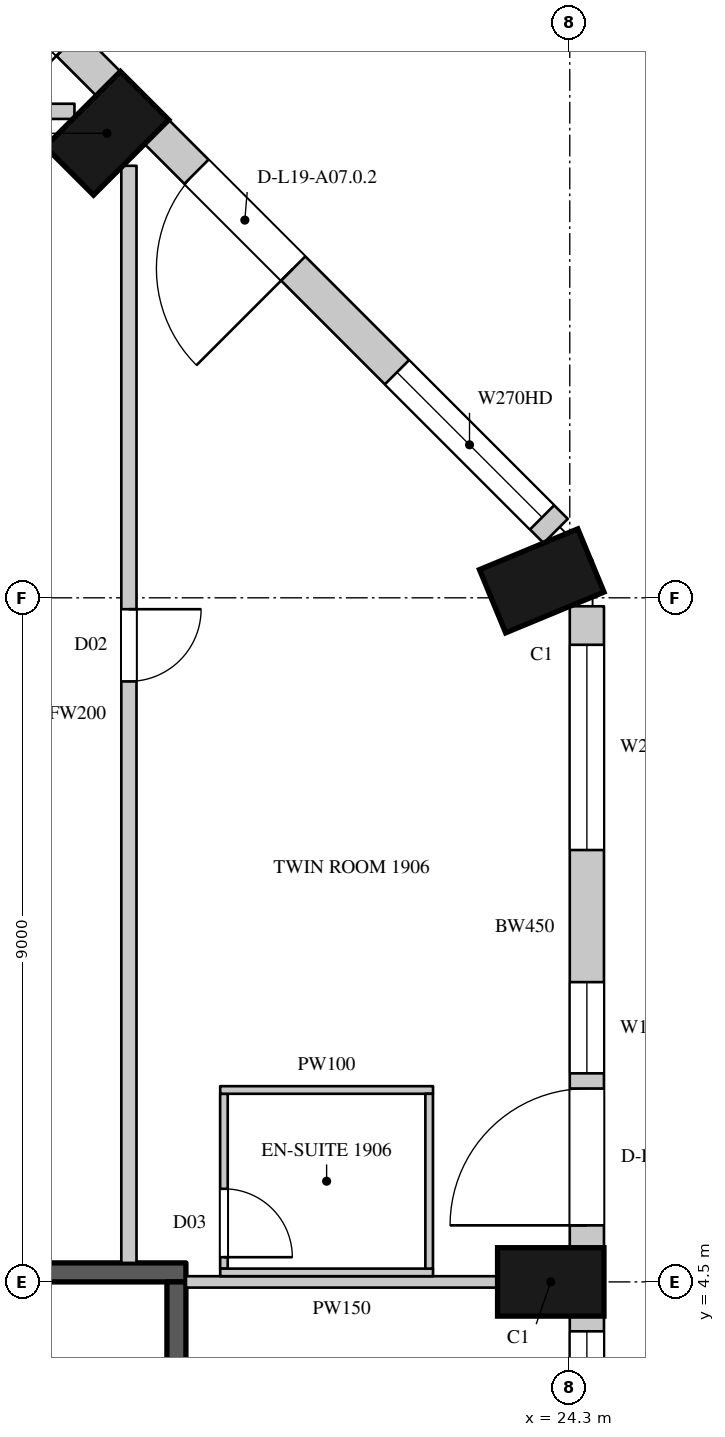
"""IFC4 building model, lengths in metres.
Left out: names, types, materials, properties, quantities, classifications, styles, units other than length and angle.
Written with IfcOpenShell. Run it as: python <this file> out.ifc"""

import sys

from ifc_helpers import new_model, si_unit, direction, frame, frame_2d, origin, origin_2d, place, context, subcontext, project, spatial, rectangle, extrude, element, fill, save


model = new_model("IFC4")
c1 = context("Model", 3, precision=1e-05, world=origin(), true_north=direction((0.0, 1.0)))
c2 = subcontext(c1, "Body", "Model", "MODEL_VIEW")
j1 = project(units=[si_unit("LENGTHUNIT", "METRE"), si_unit("PLANEANGLEUNIT", "RADIAN")], contexts=[c1])
p1 = place(None, origin())
s1 = spatial("IfcSite", under=j1, at=p1, CompositionType="ELEMENT")
p2 = place(p1, origin())
s2 = spatial("IfcBuilding", under=s1, at=p2, CompositionType="ELEMENT")
p3 = place(p2, frame((0.0, 0.0, 98.7)))
s3 = spatial("IfcBuildingStorey", under=s2, at=p3, CompositionType="ELEMENT", Elevation=98.7)
for number, where, z_axis, x_axis in (
    (1, (24.05, 4.5, 0.0), (0.0, 0.0, 1.0), (0.0, 1.0, 0.0)),
    (2, (23.931, 13.723, 0.0), (0.0, 0.0, 1.0), (-0.383, 0.924, 0.0)),
    (3, (18.211, 19.611, 0.0), (0.0, 0.0, 1.0), (-0.707, 0.707, 0.0)),
):
    element("IfcColumn", number, at=place(p3, frame(where, z_axis=z_axis, x_axis=x_axis)), inside=s3, PredefinedType="COLUMN", context=c2, shape_type="SweptSolid", body=[
        extrude(rectangle(XDim=0.9, YDim=1.4, at=origin_2d()), origin(), (0.0, 0.0, 1.0), 3.6),
    ])
p4 = place(p3, frame((24.525, -4.05, 0.0), z_axis=(0.0, 0.0, 1.0), x_axis=(0.0, 1.0, 0.0)))
e4 = element("IfcWall", 4, at=p4, inside=s3, PredefinedType="SOLIDWALL", context=c2, shape_type="SweptSolid", body=[
    extrude(rectangle(XDim=8.1, YDim=0.45, at=frame_2d((4.05, 0.0))), origin(), (0.0, 0.0, 1.0), 3.3),
])
p5 = place(p4, frame((0.2, 0.0, 0.0)))
e5 = element("IfcOpeningElement", 5, at=p5, cuts=e4, PredefinedType="OPENING", context=c2, shape_type="SweptSolid", body=[
    extrude(rectangle(XDim=1.8, YDim=2.4, at=frame_2d((0.9, 1.2))), frame((0.0, 0.235, 0.0), z_axis=(0.0, -1.0, 0.0), x_axis=(1.0, 0.0, 0.0)), (0.0, 0.0, 1.0), 0.47),
])
p6 = place(p4, frame((2.2, 0.0, 1.05)))
e6 = element("IfcOpeningElement", 6, at=p6, cuts=e4, PredefinedType="OPENING", context=c2, shape_type="SweptSolid", body=[
    extrude(rectangle(XDim=1.2, YDim=2.0, at=frame_2d((0.6, 1.0))), frame((0.0, 0.235, 0.0), z_axis=(0.0, -1.0, 0.0), x_axis=(1.0, 0.0, 0.0)), (0.0, 0.0, 1.0), 0.47),
])
p7 = place(p4, frame((4.7, 0.0, 0.0)))
e7 = element("IfcOpeningElement", 7, at=p7, cuts=e4, PredefinedType="OPENING", context=c2, shape_type="SweptSolid", body=[
    extrude(rectangle(XDim=1.8, YDim=2.4, at=frame_2d((0.9, 1.2))), frame((0.0, 0.235, 0.0), z_axis=(0.0, -1.0, 0.0), x_axis=(1.0, 0.0, 0.0)), (0.0, 0.0, 1.0), 0.47),
])
p8 = place(p4, frame((6.7, 0.0, 1.05)))
e8 = element("IfcOpeningElement", 8, at=p8, cuts=e4, PredefinedType="OPENING", context=c2, shape_type="SweptSolid", body=[
    extrude(rectangle(XDim=1.2, YDim=2.0, at=frame_2d((0.6, 1.0))), frame((0.0, 0.235, 0.0), z_axis=(0.0, -1.0, 0.0), x_axis=(1.0, 0.0, 0.0)), (0.0, 0.0, 1.0), 0.47),
])
p9 = place(p3, frame((24.525, 4.95, 0.0), z_axis=(0.0, 0.0, 1.0), x_axis=(0.0, 1.0, 0.0)))
e9 = element("IfcWall", 9, at=p9, inside=s3, PredefinedType="SOLIDWALL", context=c2, shape_type="SweptSolid", body=[
    extrude(rectangle(XDim=8.439, YDim=0.45, at=frame_2d((4.219, 0.0))), origin(), (0.0, 0.0, 1.0), 3.3),
])
p10 = place(p9, frame((0.294, 0.0, 0.0)))
e10 = element("IfcOpeningElement", 10, at=p10, cuts=e9, PredefinedType="OPENING", context=c2, shape_type="SweptSolid", body=[
    extrude(rectangle(XDim=1.8, YDim=2.4, at=frame_2d((0.9, 1.2))), frame((0.0, 0.235, 0.0), z_axis=(0.0, -1.0, 0.0), x_axis=(1.0, 0.0, 0.0)), (0.0, 0.0, 1.0), 0.47),
])
p11 = place(p9, frame((2.294, 0.0, 1.05)))
e11 = element("IfcOpeningElement", 11, at=p11, cuts=e9, PredefinedType="OPENING", context=c2, shape_type="SweptSolid", body=[
    extrude(rectangle(XDim=1.2, YDim=2.0, at=frame_2d((0.6, 1.0))), frame((0.0, 0.235, 0.0), z_axis=(0.0, -1.0, 0.0), x_axis=(1.0, 0.0, 0.0)), (0.0, 0.0, 1.0), 0.47),
])
p12 = place(p9, frame((5.232, 0.0, 1.05)))
e12 = element("IfcOpeningElement", 12, at=p12, cuts=e9, PredefinedType="OPENING", context=c2, shape_type="SweptSolid", body=[
    extrude(rectangle(XDim=2.7, YDim=2.0, at=frame_2d((1.35, 1.0))), frame((0.0, 0.235, 0.0), z_axis=(0.0, -1.0, 0.0), x_axis=(1.0, 0.0, 0.0)), (0.0, 0.0, 1.0), 0.47),
])
p13 = place(p3, frame((24.115, 14.379, 0.0), z_axis=(0.0, 0.0, 1.0), x_axis=(-0.707106781187, 0.707106781187, 0.0)))
e13 = element("IfcWall", 13, at=p13, inside=s3, PredefinedType="SOLIDWALL", context=c2, shape_type="SweptSolid", body=[
    extrude(rectangle(XDim=7.424, YDim=0.45, at=frame_2d((3.712, 0.0))), origin(), (0.0, 0.0, 1.0), 3.3),
])
p14 = place(p13, frame((0.253, 0.0, 1.05)))
e14 = element("IfcOpeningElement", 14, at=p14, cuts=e13, PredefinedType="OPENING", context=c2, shape_type="SweptSolid", body=[
    extrude(rectangle(XDim=2.7, YDim=2.0, at=frame_2d((1.35, 1.0))), frame((0.0, 0.235, 0.0), z_axis=(0.0, -1.0, 0.0), x_axis=(1.0, 0.0, 0.0)), (0.0, 0.0, 1.0), 0.47),
])
p15 = place(p13, frame((4.884, 0.0, 0.0)))
e15 = element("IfcOpeningElement", 15, at=p15, cuts=e13, PredefinedType="OPENING", context=c2, shape_type="SweptSolid", body=[
    extrude(rectangle(XDim=1.8, YDim=2.4, at=frame_2d((0.9, 1.2))), frame((0.0, 0.235, 0.0), z_axis=(0.0, -1.0, 0.0), x_axis=(1.0, 0.0, 0.0)), (0.0, 0.0, 1.0), 0.47),
])
p16 = place(p3, frame((18.229, 20.265, 0.0), z_axis=(0.0, 0.0, 1.0), x_axis=(-0.707106781187, 0.707106781187, 0.0)))
e16 = element("IfcWall", 16, at=p16, inside=s3, PredefinedType="SOLIDWALL", context=c2, shape_type="SweptSolid", body=[
    extrude(rectangle(XDim=7.424, YDim=0.45, at=frame_2d((3.712, 0.0))), origin(), (0.0, 0.0, 1.0), 3.3),
])
p17 = place(p16, frame((0.74, 0.0, 0.0)))
e17 = element("IfcOpeningElement", 17, at=p17, cuts=e16, PredefinedType="OPENING", context=c2, shape_type="SweptSolid", body=[
    extrude(rectangle(XDim=1.8, YDim=2.4, at=frame_2d((0.9, 1.2))), frame((0.0, 0.235, 0.0), z_axis=(0.0, -1.0, 0.0), x_axis=(1.0, 0.0, 0.0)), (0.0, 0.0, 1.0), 0.47),
])
p18 = place(p16, frame((4.471, 0.0, 1.05)))
e18 = element("IfcOpeningElement", 18, at=p18, cuts=e16, PredefinedType="OPENING", context=c2, shape_type="SweptSolid", body=[
    extrude(rectangle(XDim=2.7, YDim=2.0, at=frame_2d((1.35, 1.0))), frame((0.0, 0.235, 0.0), z_axis=(0.0, -1.0, 0.0), x_axis=(1.0, 0.0, 0.0)), (0.0, 0.0, 1.0), 0.47),
])
p19 = place(p3, frame((23.15, 16.864, 0.0), z_axis=(0.0, 0.0, 1.0), x_axis=(-0.707106781187, 0.707106781187, 0.0)))
e19 = element("IfcWall", 19, at=p19, inside=s3, PredefinedType="SOLIDWALL", context=c2, shape_type="SweptSolid", body=[
    extrude(rectangle(XDim=1.445, YDim=0.45, at=frame_2d((0.722, 0.0))), origin(), (0.0, 0.0, 1.0), 0.6),
])
p20 = place(p3, frame((19.937, 20.078, 0.0), z_axis=(0.0, 0.0, 1.0), x_axis=(-0.707106781187, 0.707106781187, 0.0)))
e20 = element("IfcWall", 20, at=p20, inside=s3, PredefinedType="SOLIDWALL", context=c2, shape_type="SweptSolid", body=[
    extrude(rectangle(XDim=1.781, YDim=0.45, at=frame_2d((0.89, 0.0))), origin(), (0.0, 0.0, 1.0), 0.6),
])
p21 = place(p3, frame((-23.765, 19.9, 0.0), z_axis=(0.0, 0.0, 1.0), x_axis=(1.0, 0.0, 0.0)))
e21 = element("IfcWall", 21, at=p21, inside=s3, PredefinedType="PARTITIONING", context=c2, shape_type="SweptSolid", body=[
    extrude(rectangle(XDim=41.549, YDim=0.2, at=frame_2d((20.774, 0.0))), origin(), (0.0, 0.0, 1.0), 3.3),
])
p22 = place(p21, frame((14.2, 0.0, 0.0)))
e22 = element("IfcOpeningElement", 22, at=p22, cuts=e21, PredefinedType="OPENING", context=c2, shape_type="SweptSolid", body=[
    extrude(rectangle(XDim=0.9, YDim=2.2, at=frame_2d((0.45, 1.1))), frame((0.0, 0.11, 0.0), z_axis=(0.0, -1.0, 0.0), x_axis=(1.0, 0.0, 0.0)), (0.0, 0.0, 1.0), 0.22),
])
p23 = place(p21, frame((27.05, 0.0, 0.0)))
e23 = element("IfcOpeningElement", 23, at=p23, cuts=e21, PredefinedType="OPENING", context=c2, shape_type="SweptSolid", body=[
    extrude(rectangle(XDim=0.9, YDim=2.2, at=frame_2d((0.45, 1.1))), frame((0.0, 0.11, 0.0), z_axis=(0.0, -1.0, 0.0), x_axis=(1.0, 0.0, 0.0)), (0.0, 0.0, 1.0), 0.22),
])
p24 = place(p21, frame((0.75, 0.0, 0.0)))
e24 = element("IfcOpeningElement", 24, at=p24, cuts=e21, PredefinedType="OPENING", context=c2, shape_type="SweptSolid", body=[
    extrude(rectangle(XDim=1.1, YDim=2.4, at=frame_2d((0.55, 1.2))), frame((0.0, 0.11, 0.0), z_axis=(0.0, -1.0, 0.0), x_axis=(1.0, 0.0, 0.0)), (0.0, 0.0, 1.0), 0.22),
])
p25 = place(p21, frame((23.15, 0.0, 0.0)))
e25 = element("IfcOpeningElement", 25, at=p25, cuts=e21, PredefinedType="OPENING", context=c2, shape_type="SweptSolid", body=[
    extrude(rectangle(XDim=0.95, YDim=2.2, at=frame_2d((0.475, 1.1))), frame((0.0, 0.11, 0.0), z_axis=(0.0, -1.0, 0.0), x_axis=(1.0, 0.0, 0.0)), (0.0, 0.0, 1.0), 0.22),
])
p26 = place(p21, frame((34.95, 0.0, 0.0)))
e26 = element("IfcOpeningElement", 26, at=p26, cuts=e21, PredefinedType="OPENING", context=c2, shape_type="SweptSolid", body=[
    extrude(rectangle(XDim=0.95, YDim=2.2, at=frame_2d((0.475, 1.1))), frame((0.0, 0.11, 0.0), z_axis=(0.0, -1.0, 0.0), x_axis=(1.0, 0.0, 0.0)), (0.0, 0.0, 1.0), 0.22),
])
p27 = place(p3, frame((18.5, 4.75, 0.0), z_axis=(0.0, 0.0, 1.0), x_axis=(0.0, 1.0, 0.0)))
e27 = element("IfcWall", 27, at=p27, inside=s3, PredefinedType="PARTITIONING", context=c2, shape_type="SweptSolid", body=[
    extrude(rectangle(XDim=14.434, YDim=0.2, at=frame_2d((7.217, 0.0))), origin(), (0.0, 0.0, 1.0), 3.3),
])
p28 = place(p27, frame((7.65, 0.0, 0.0)))
e28 = element("IfcOpeningElement", 28, at=p28, cuts=e27, PredefinedType="OPENING", context=c2, shape_type="SweptSolid", body=[
    extrude(rectangle(XDim=0.95, YDim=2.2, at=frame_2d((0.475, 1.1))), frame((0.0, 0.11, 0.0), z_axis=(0.0, -1.0, 0.0), x_axis=(1.0, 0.0, 0.0)), (0.0, 0.0, 1.0), 0.22),
])
p29 = place(p3, frame((19.25, 4.5, 0.0), z_axis=(0.0, 0.0, 1.0), x_axis=(1.0, 0.0, 0.0)))
e29 = element("IfcWall", 29, at=p29, inside=s3, PredefinedType="PARTITIONING", context=c2, shape_type="SweptSolid", body=[
    extrude(rectangle(XDim=4.1, YDim=0.15, at=frame_2d((2.05, 0.0))), origin(), (0.0, 0.0, 1.0), 3.3),
])
p30 = place(p3, frame((14.55, 4.625, 0.0), z_axis=(0.0, 0.0, 1.0), x_axis=(1.0, 0.0, 0.0)))
e30 = element("IfcWall", 30, at=p30, inside=s3, PredefinedType="SHEAR", context=c2, shape_type="SweptSolid", body=[
    extrude(rectangle(XDim=4.7, YDim=0.25, at=frame_2d((2.35, 0.0))), origin(), (0.0, 0.0, 1.0), 3.3),
])
p31 = place(p3, frame((19.125, -4.5, 0.0), z_axis=(0.0, 0.0, 1.0), x_axis=(0.0, 1.0, 0.0)))
e31 = element("IfcWall", 31, at=p31, inside=s3, PredefinedType="SHEAR", context=c2, shape_type="SweptSolid", body=[
    extrude(rectangle(XDim=9.0, YDim=0.25, at=frame_2d((4.5, 0.0))), origin(), (0.0, 0.0, 1.0), 3.3),
])
p32 = place(p3, frame((19.75, 4.675, 0.0), z_axis=(0.0, 0.0, 1.0), x_axis=(0.0, 1.0, 0.0)))
e32 = element("IfcWall", 32, at=p32, inside=s3, PredefinedType="PARTITIONING", context=c2, shape_type="SweptSolid", body=[
    extrude(rectangle(XDim=2.3, YDim=0.1, at=frame_2d((1.15, 0.0))), origin(), (0.0, 0.0, 1.0), 3.3),
])
p33 = place(p32, frame((0.15, 0.0, 0.0)))
e33 = element("IfcOpeningElement", 33, at=p33, cuts=e32, PredefinedType="OPENING", context=c2, shape_type="SweptSolid", body=[
    extrude(rectangle(XDim=0.9, YDim=2.2, at=frame_2d((0.45, 1.1))), frame((0.0, 0.06, 0.0), z_axis=(0.0, -1.0, 0.0), x_axis=(1.0, 0.0, 0.0)), (0.0, 0.0, 1.0), 0.12),
])
for number, where, z_axis, x_axis in (
    (34, (19.701, 4.625, 0.0), (0.0, 0.0, 1.0), (1.0, 0.0, 0.0)),
    (35, (19.701, 7.025, 0.0), (0.0, 0.0, 1.0), (1.0, 0.0, 0.0)),
):
    element("IfcWall", number, at=place(p3, frame(where, z_axis=z_axis, x_axis=x_axis)), inside=s3, PredefinedType="PARTITIONING", context=c2, shape_type="SweptSolid", body=[
        extrude(rectangle(XDim=2.8, YDim=0.1, at=frame_2d((1.4, 0.0))), origin(), (0.0, 0.0, 1.0), 3.3),
    ])
p34 = place(p3, frame((22.45, 4.675, 0.0), z_axis=(0.0, 0.0, 1.0), x_axis=(0.0, 1.0, 0.0)))
e36 = element("IfcWall", 36, at=p34, inside=s3, PredefinedType="PARTITIONING", context=c2, shape_type="SweptSolid", body=[
    extrude(rectangle(XDim=2.3, YDim=0.1, at=frame_2d((1.15, 0.0))), origin(), (0.0, 0.0, 1.0), 3.3),
])
p35 = place(p8, origin())
e37 = element("IfcWindow", 37, at=p35, inside=s3, PartitioningType="SINGLE_PANEL", PredefinedType="WINDOW", context=c2, shape_type="SweptSolid", body=[
    extrude(rectangle(XDim=1.2, YDim=2.0, at=frame_2d((0.6, 1.0))), frame((0.0, 0.135, 0.0), z_axis=(0.0, -1.0, 0.0), x_axis=(1.0, 0.0, 0.0)), (0.0, 0.0, 1.0), 0.06),
])
fill(e8, e37)
p36 = place(p10, origin())
e38 = element("IfcDoor", 38, at=p36, inside=s3, OperationType="SLIDING_TO_LEFT", PredefinedType="DOOR", context=c2, shape_type="SweptSolid", body=[
    extrude(rectangle(XDim=1.8, YDim=2.4, at=frame_2d((0.9, 1.2))), frame((0.0, 0.13, 0.0), z_axis=(0.0, -1.0, 0.0), x_axis=(1.0, 0.0, 0.0)), (0.0, 0.0, 1.0), 0.05),
])
fill(e10, e38)
p37 = place(p11, origin())
e39 = element("IfcWindow", 39, at=p37, inside=s3, PartitioningType="SINGLE_PANEL", PredefinedType="WINDOW", context=c2, shape_type="SweptSolid", body=[
    extrude(rectangle(XDim=1.2, YDim=2.0, at=frame_2d((0.6, 1.0))), frame((0.0, 0.135, 0.0), z_axis=(0.0, -1.0, 0.0), x_axis=(1.0, 0.0, 0.0)), (0.0, 0.0, 1.0), 0.06),
])
fill(e11, e39)
p38 = place(p12, origin())
e40 = element("IfcWindow", 40, at=p38, inside=s3, PartitioningType="SINGLE_PANEL", PredefinedType="WINDOW", context=c2, shape_type="SweptSolid", body=[
    extrude(rectangle(XDim=2.7, YDim=2.0, at=frame_2d((1.35, 1.0))), frame((0.0, 0.135, 0.0), z_axis=(0.0, -1.0, 0.0), x_axis=(1.0, 0.0, 0.0)), (0.0, 0.0, 1.0), 0.06),
])
fill(e12, e40)
p39 = place(p14, origin())
e41 = element("IfcWindow", 41, at=p39, inside=s3, PartitioningType="SINGLE_PANEL", PredefinedType="WINDOW", context=c2, shape_type="SweptSolid", body=[
    extrude(rectangle(XDim=2.7, YDim=2.0, at=frame_2d((1.35, 1.0))), frame((0.0, 0.135, 0.0), z_axis=(0.0, -1.0, 0.0), x_axis=(1.0, 0.0, 0.0)), (0.0, 0.0, 1.0), 0.06),
])
fill(e14, e41)
p40 = place(p15, origin())
e42 = element("IfcDoor", 42, at=p40, inside=s3, OperationType="SLIDING_TO_LEFT", PredefinedType="DOOR", context=c2, shape_type="SweptSolid", body=[
    extrude(rectangle(XDim=1.8, YDim=2.4, at=frame_2d((0.9, 1.2))), frame((0.0, 0.13, 0.0), z_axis=(0.0, -1.0, 0.0), x_axis=(1.0, 0.0, 0.0)), (0.0, 0.0, 1.0), 0.05),
])
fill(e15, e42)
p41 = place(p28, origin())
e43 = element("IfcDoor", 43, at=p41, inside=s3, OperationType="SINGLE_SWING_LEFT", PredefinedType="DOOR", context=c2, shape_type="SweptSolid", body=[
    extrude(rectangle(XDim=0.95, YDim=2.2, at=frame_2d((0.475, 1.1))), frame((0.0, 0.025, 0.0), z_axis=(0.0, -1.0, 0.0), x_axis=(1.0, 0.0, 0.0)), (0.0, 0.0, 1.0), 0.05),
])
fill(e28, e43)
p42 = place(p33, origin())
e44 = element("IfcDoor", 44, at=p42, inside=s3, OperationType="SINGLE_SWING_RIGHT", PredefinedType="DOOR", context=c2, shape_type="SweptSolid", body=[
    extrude(rectangle(XDim=0.9, YDim=2.2, at=frame_2d((0.45, 1.1))), frame((0.0, 0.025, 0.0), z_axis=(0.0, -1.0, 0.0), x_axis=(1.0, 0.0, 0.0)), (0.0, 0.0, 1.0), 0.05),
])
fill(e33, e44)
save(model, sys.argv[1])
